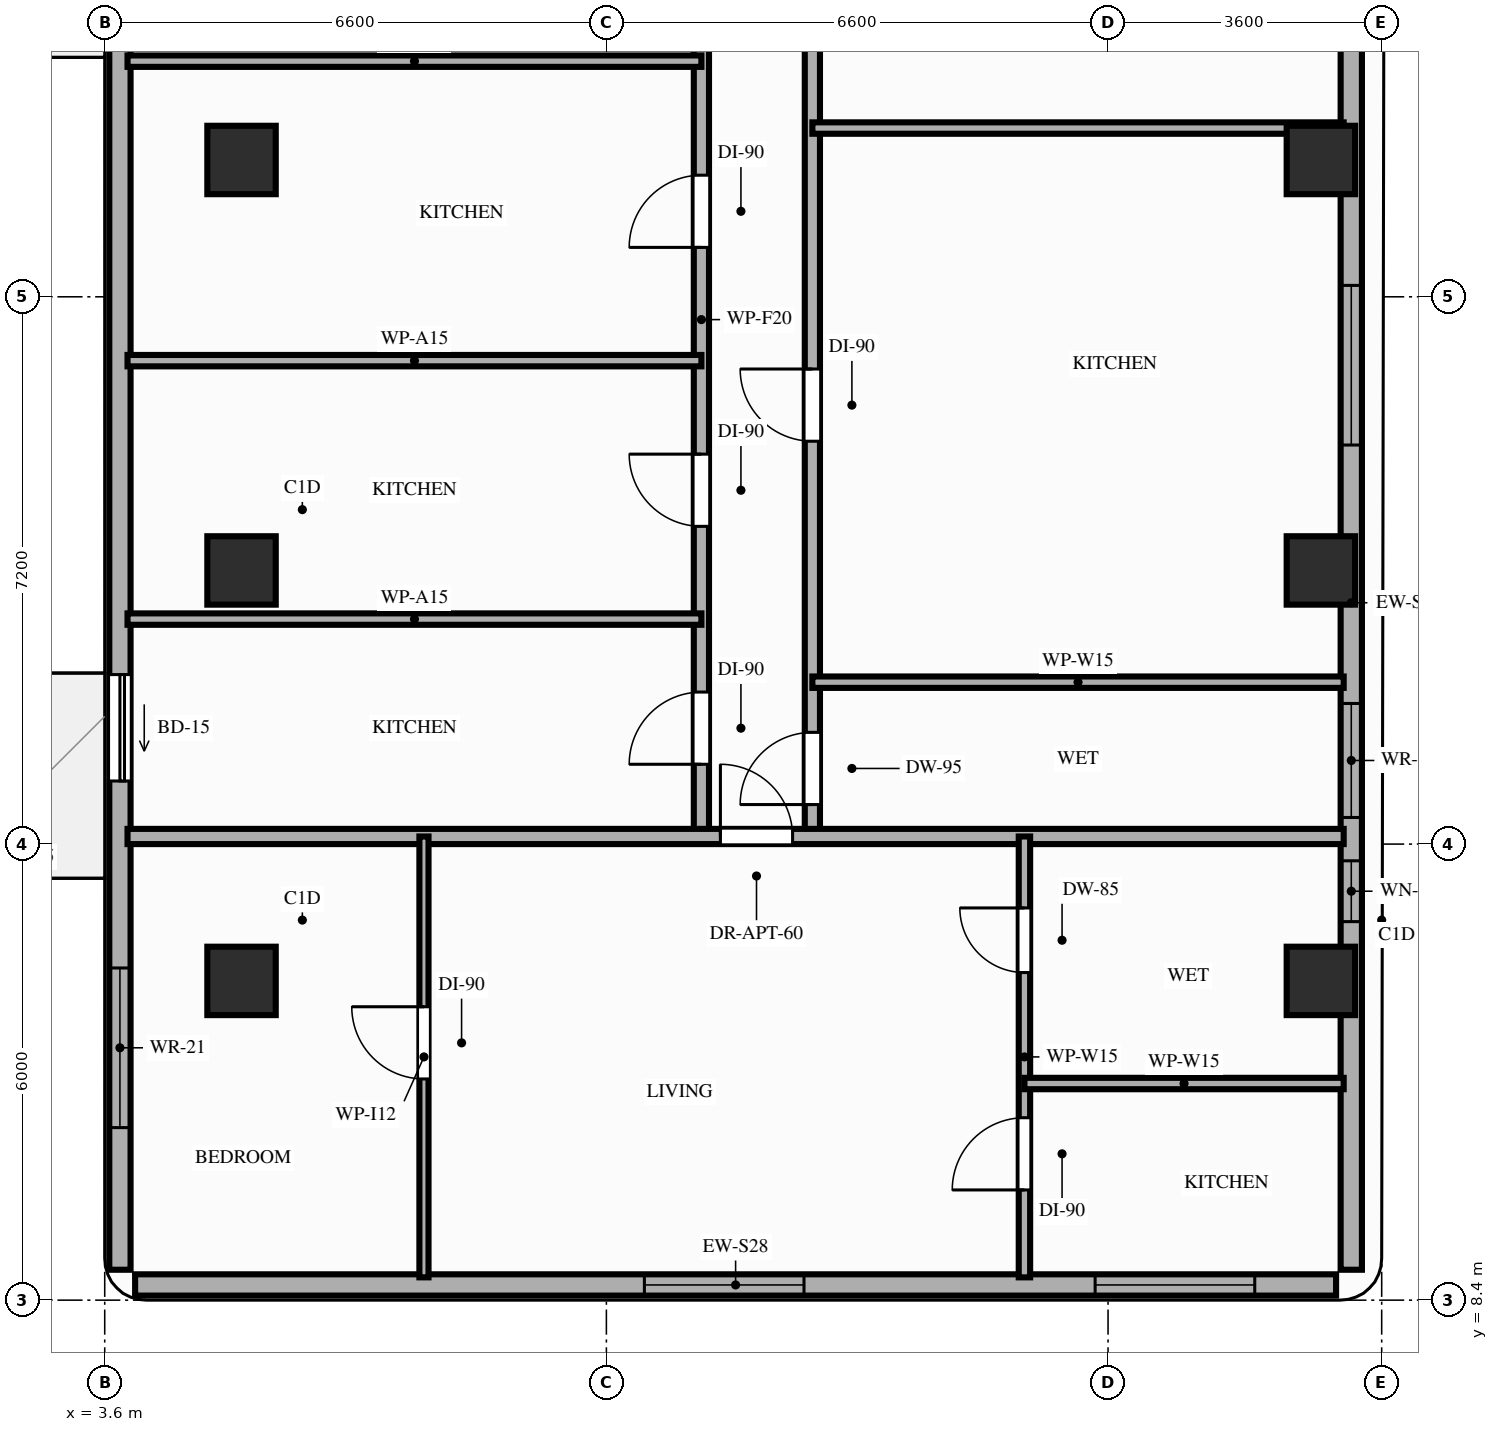
"""IFC4 building model, lengths in metres.
Left out: names, types, materials, properties, quantities, classifications, styles, units other than length and angle.
Written with IfcOpenShell. Run it as: python <this file> out.ifc"""

import sys

from ifc_helpers import new_model, si_unit, direction, frame, frame_2d, origin, origin_2d, place, context, subcontext, project, spatial, rectangle, extrude, element, fill, save


model = new_model("IFC4")
c1 = context("Model", 3, precision=1e-05, world=origin(), true_north=direction((0.0, 1.0)))
c2 = subcontext(c1, "Body", "Model", "MODEL_VIEW")
j1 = project(units=[si_unit("LENGTHUNIT", "METRE"), si_unit("PLANEANGLEUNIT", "RADIAN")], contexts=[c1])
p1 = place(None, origin())
s1 = spatial("IfcSite", under=j1, at=p1, CompositionType="ELEMENT")
p2 = place(p1, origin())
s2 = spatial("IfcBuilding", under=s1, at=p2, CompositionType="ELEMENT")
p3 = place(p2, frame((0.0, 0.0, 198.4)))
s3 = spatial("IfcBuildingStorey", under=s2, at=p3, CompositionType="ELEMENT", Elevation=198.4)
for number, where, z_axis, x_axis in (
    (1, (5.4, 12.6, 0.0), (0.0, 0.0, 1.0), (1.0, 0.0, 0.0)),
    (2, (19.6, 12.6, 0.0), (0.0, 0.0, 1.0), (1.0, 0.0, 0.0)),
    (3, (5.4, 18.0, 0.0), (0.0, 0.0, 1.0), (1.0, 0.0, 0.0)),
    (4, (19.6, 18.0, 0.0), (0.0, 0.0, 1.0), (1.0, 0.0, 0.0)),
    (5, (5.4, 23.4, 0.0), (0.0, 0.0, 1.0), (1.0, 0.0, 0.0)),
    (6, (19.6, 23.4, 0.0), (0.0, 0.0, 1.0), (1.0, 0.0, 0.0)),
):
    element("IfcColumn", number, at=place(p3, frame(where, z_axis=z_axis, x_axis=x_axis)), inside=s3, PredefinedType="COLUMN", context=c2, shape_type="SweptSolid", body=[
        extrude(rectangle(XDim=0.9, YDim=0.9, at=origin_2d()), origin(), (0.0, 0.0, 1.0), 3.2),
    ])
p4 = place(p3, frame((4.0, 8.6, 0.0), z_axis=(0.0, 0.0, 1.0), x_axis=(1.0, 0.0, 0.0)))
e7 = element("IfcWall", 7, at=p4, inside=s3, PredefinedType="STANDARD", context=c2, shape_type="SweptSolid", body=[
    extrude(rectangle(XDim=15.8, YDim=0.28, at=frame_2d((7.9, 0.0))), origin(), (0.0, 0.0, 1.0), 3.02),
])
p5 = place(p4, frame((6.7, 0.0, 0.85)))
e8 = element("IfcOpeningElement", 8, at=p5, cuts=e7, PredefinedType="OPENING", context=c2, shape_type="SweptSolid", body=[
    extrude(rectangle(XDim=2.1, YDim=1.8, at=frame_2d((1.05, 0.9))), frame((0.0, 0.15, 0.0), z_axis=(0.0, -1.0, 0.0), x_axis=(1.0, 0.0, 0.0)), (0.0, 0.0, 1.0), 0.3),
])
p6 = place(p4, frame((12.63, 0.0, 0.85)))
e9 = element("IfcOpeningElement", 9, at=p6, cuts=e7, PredefinedType="OPENING", context=c2, shape_type="SweptSolid", body=[
    extrude(rectangle(XDim=2.1, YDim=1.8, at=frame_2d((1.05, 0.9))), frame((0.0, 0.15, 0.0), z_axis=(0.0, -1.0, 0.0), x_axis=(1.0, 0.0, 0.0)), (0.0, 0.0, 1.0), 0.3),
])
p7 = place(p3, frame((3.8, 42.1, 0.0), z_axis=(0.0, 0.0, 1.0), x_axis=(0.0, -1.0, 0.0)))
e10 = element("IfcWall", 10, at=p7, inside=s3, PredefinedType="STANDARD", context=c2, shape_type="SweptSolid", body=[
    extrude(rectangle(XDim=33.3, YDim=0.28, at=frame_2d((16.65, 0.0))), origin(), (0.0, 0.0, 1.0), 2.71),
])
p8 = place(p7, frame((25.47, 0.0, 0.0)))
e11 = element("IfcOpeningElement", 11, at=p8, cuts=e10, PredefinedType="OPENING", context=c2, shape_type="SweptSolid", body=[
    extrude(rectangle(XDim=1.4, YDim=2.1, at=frame_2d((0.7, 1.05))), frame((0.0, 0.15, 0.0), z_axis=(0.0, -1.0, 0.0), x_axis=(1.0, 0.0, 0.0)), (0.0, 0.0, 1.0), 0.3),
])
p9 = place(p7, frame((15.3, 0.0, 0.0)))
e12 = element("IfcOpeningElement", 12, at=p9, cuts=e10, PredefinedType="OPENING", context=c2, shape_type="SweptSolid", body=[
    extrude(rectangle(XDim=1.4, YDim=2.1, at=frame_2d((0.7, 1.05))), frame((0.0, 0.15, 0.0), z_axis=(0.0, -1.0, 0.0), x_axis=(1.0, 0.0, 0.0)), (0.0, 0.0, 1.0), 0.3),
])
p10 = place(p7, frame((29.33, 0.0, 0.85)))
e13 = element("IfcOpeningElement", 13, at=p10, cuts=e10, PredefinedType="OPENING", context=c2, shape_type="SweptSolid", body=[
    extrude(rectangle(XDim=2.1, YDim=1.61, at=frame_2d((1.05, 0.805))), frame((0.0, 0.15, 0.0), z_axis=(0.0, -1.0, 0.0), x_axis=(1.0, 0.0, 0.0)), (0.0, 0.0, 1.0), 0.3),
])
p11 = place(p7, frame((9.75, 0.0, 0.85)))
e14 = element("IfcOpeningElement", 14, at=p11, cuts=e10, PredefinedType="OPENING", context=c2, shape_type="SweptSolid", body=[
    extrude(rectangle(XDim=2.1, YDim=1.61, at=frame_2d((1.05, 0.805))), frame((0.0, 0.15, 0.0), z_axis=(0.0, -1.0, 0.0), x_axis=(1.0, 0.0, 0.0)), (0.0, 0.0, 1.0), 0.3),
])
p12 = place(p7, frame((3.65, 0.0, 0.85)))
e15 = element("IfcOpeningElement", 15, at=p12, cuts=e10, PredefinedType="OPENING", context=c2, shape_type="SweptSolid", body=[
    extrude(rectangle(XDim=2.1, YDim=1.61, at=frame_2d((1.05, 0.805))), frame((0.0, 0.15, 0.0), z_axis=(0.0, -1.0, 0.0), x_axis=(1.0, 0.0, 0.0)), (0.0, 0.0, 1.0), 0.3),
])
p13 = place(p3, frame((20.0, 8.8, 0.0), z_axis=(0.0, 0.0, 1.0), x_axis=(0.0, 1.0, 0.0)))
e16 = element("IfcWall", 16, at=p13, inside=s3, PredefinedType="STANDARD", context=c2, shape_type="SweptSolid", body=[
    extrude(rectangle(XDim=17.55, YDim=0.28, at=frame_2d((8.775, 0.0))), origin(), (0.0, 0.0, 1.0), 2.51),
])
p14 = place(p13, frame((4.58, 0.0, 0.85)))
e17 = element("IfcOpeningElement", 17, at=p14, cuts=e16, PredefinedType="OPENING", context=c2, shape_type="SweptSolid", body=[
    extrude(rectangle(XDim=0.8, YDim=1.41, at=frame_2d((0.4, 0.705))), frame((0.0, 0.15, 0.0), z_axis=(0.0, -1.0, 0.0), x_axis=(1.0, 0.0, 0.0)), (0.0, 0.0, 1.0), 0.3),
])
p15 = place(p13, frame((5.95, 0.0, 0.85)))
e18 = element("IfcOpeningElement", 18, at=p15, cuts=e16, PredefinedType="OPENING", context=c2, shape_type="SweptSolid", body=[
    extrude(rectangle(XDim=1.5, YDim=1.41, at=frame_2d((0.75, 0.705))), frame((0.0, 0.15, 0.0), z_axis=(0.0, -1.0, 0.0), x_axis=(1.0, 0.0, 0.0)), (0.0, 0.0, 1.0), 0.3),
])
p16 = place(p13, frame((10.85, 0.0, 0.85)))
e19 = element("IfcOpeningElement", 19, at=p16, cuts=e16, PredefinedType="OPENING", context=c2, shape_type="SweptSolid", body=[
    extrude(rectangle(XDim=2.1, YDim=1.41, at=frame_2d((1.05, 0.705))), frame((0.0, 0.15, 0.0), z_axis=(0.0, -1.0, 0.0), x_axis=(1.0, 0.0, 0.0)), (0.0, 0.0, 1.0), 0.3),
])
p17 = place(p3, frame((11.45, 14.5, 0.0), z_axis=(0.0, 0.0, 1.0), x_axis=(0.0, 1.0, 0.0)))
e20 = element("IfcWall", 20, at=p17, inside=s3, PredefinedType="PARTITIONING", context=c2, shape_type="SweptSolid", body=[
    extrude(rectangle(XDim=13.6, YDim=0.2, at=frame_2d((6.8, 0.0))), origin(), (0.0, 0.0, 1.0), 2.51),
])
p18 = place(p17, frame((0.95, 0.0, 0.0)))
e21 = element("IfcOpeningElement", 21, at=p18, cuts=e20, PredefinedType="OPENING", context=c2, shape_type="SweptSolid", body=[
    extrude(rectangle(XDim=0.95, YDim=2.15, at=frame_2d((0.475, 1.075))), frame((0.0, 0.11, 0.0), z_axis=(0.0, -1.0, 0.0), x_axis=(1.0, 0.0, 0.0)), (0.0, 0.0, 1.0), 0.22),
])
p19 = place(p17, frame((4.08, 0.0, 0.0)))
e22 = element("IfcOpeningElement", 22, at=p19, cuts=e20, PredefinedType="OPENING", context=c2, shape_type="SweptSolid", body=[
    extrude(rectangle(XDim=0.95, YDim=2.15, at=frame_2d((0.475, 1.075))), frame((0.0, 0.11, 0.0), z_axis=(0.0, -1.0, 0.0), x_axis=(1.0, 0.0, 0.0)), (0.0, 0.0, 1.0), 0.22),
])
p20 = place(p17, frame((7.75, 0.0, 0.0)))
e23 = element("IfcOpeningElement", 23, at=p20, cuts=e20, PredefinedType="OPENING", context=c2, shape_type="SweptSolid", body=[
    extrude(rectangle(XDim=0.95, YDim=2.15, at=frame_2d((0.475, 1.075))), frame((0.0, 0.11, 0.0), z_axis=(0.0, -1.0, 0.0), x_axis=(1.0, 0.0, 0.0)), (0.0, 0.0, 1.0), 0.22),
])
p21 = place(p17, frame((11.42, 0.0, 0.0)))
e24 = element("IfcOpeningElement", 24, at=p21, cuts=e20, PredefinedType="OPENING", context=c2, shape_type="SweptSolid", body=[
    extrude(rectangle(XDim=0.95, YDim=2.15, at=frame_2d((0.475, 1.075))), frame((0.0, 0.11, 0.0), z_axis=(0.0, -1.0, 0.0), x_axis=(1.0, 0.0, 0.0)), (0.0, 0.0, 1.0), 0.22),
])
p22 = place(p3, frame((12.91, 14.5, 0.0), z_axis=(0.0, 0.0, 1.0), x_axis=(0.0, 1.0, 0.0)))
e25 = element("IfcWall", 25, at=p22, inside=s3, PredefinedType="PARTITIONING", context=c2, shape_type="SweptSolid", body=[
    extrude(rectangle(XDim=13.6, YDim=0.2, at=frame_2d((6.8, 0.0))), origin(), (0.0, 0.0, 1.0), 2.51),
])
p23 = place(p22, frame((0.42, 0.0, 0.0)))
e26 = element("IfcOpeningElement", 26, at=p23, cuts=e25, PredefinedType="OPENING", context=c2, shape_type="SweptSolid", body=[
    extrude(rectangle(XDim=0.95, YDim=2.1, at=frame_2d((0.475, 1.05))), frame((0.0, 0.11, 0.0), z_axis=(0.0, -1.0, 0.0), x_axis=(1.0, 0.0, 0.0)), (0.0, 0.0, 1.0), 0.22),
])
p24 = place(p22, frame((5.2, 0.0, 0.0)))
e27 = element("IfcOpeningElement", 27, at=p24, cuts=e25, PredefinedType="OPENING", context=c2, shape_type="SweptSolid", body=[
    extrude(rectangle(XDim=0.95, YDim=2.15, at=frame_2d((0.475, 1.075))), frame((0.0, 0.11, 0.0), z_axis=(0.0, -1.0, 0.0), x_axis=(1.0, 0.0, 0.0)), (0.0, 0.0, 1.0), 0.22),
])
p25 = place(p22, frame((10.98, 0.0, 0.0)))
e28 = element("IfcOpeningElement", 28, at=p25, cuts=e25, PredefinedType="OPENING", context=c2, shape_type="SweptSolid", body=[
    extrude(rectangle(XDim=0.95, YDim=2.15, at=frame_2d((0.475, 1.075))), frame((0.0, 0.11, 0.0), z_axis=(0.0, -1.0, 0.0), x_axis=(1.0, 0.0, 0.0)), (0.0, 0.0, 1.0), 0.22),
])
p26 = place(p3, frame((3.9, 14.5, 0.0), z_axis=(0.0, 0.0, 1.0), x_axis=(1.0, 0.0, 0.0)))
e29 = element("IfcWall", 29, at=p26, inside=s3, PredefinedType="PARTITIONING", context=c2, shape_type="SweptSolid", body=[
    extrude(rectangle(XDim=16.0, YDim=0.2, at=frame_2d((8.0, 0.0))), origin(), (0.0, 0.0, 1.0), 2.51),
])
p27 = place(p26, frame((7.8, 0.0, 0.0)))
e30 = element("IfcOpeningElement", 30, at=p27, cuts=e29, PredefinedType="OPENING", context=c2, shape_type="SweptSolid", body=[
    extrude(rectangle(XDim=0.95, YDim=2.15, at=frame_2d((0.475, 1.075))), frame((0.0, 0.11, 0.0), z_axis=(0.0, -1.0, 0.0), x_axis=(1.0, 0.0, 0.0)), (0.0, 0.0, 1.0), 0.22),
])
p28 = place(p3, frame((7.8, 8.7, 0.0), z_axis=(0.0, 0.0, 1.0), x_axis=(0.0, 1.0, 0.0)))
e31 = element("IfcWall", 31, at=p28, inside=s3, PredefinedType="PARTITIONING", context=c2, shape_type="SweptSolid", body=[
    extrude(rectangle(XDim=5.8, YDim=0.12, at=frame_2d((2.9, 0.0))), origin(), (0.0, 0.0, 1.0), 2.51),
])
p29 = place(p28, frame((2.61, 0.0, 0.0)))
e32 = element("IfcOpeningElement", 32, at=p29, cuts=e31, PredefinedType="OPENING", context=c2, shape_type="SweptSolid", body=[
    extrude(rectangle(XDim=0.95, YDim=2.15, at=frame_2d((0.475, 1.075))), frame((0.0, 0.07, 0.0), z_axis=(0.0, -1.0, 0.0), x_axis=(1.0, 0.0, 0.0)), (0.0, 0.0, 1.0), 0.14),
])
p30 = place(p3, frame((15.7, 8.7, 0.0), z_axis=(0.0, 0.0, 1.0), x_axis=(0.0, 1.0, 0.0)))
e33 = element("IfcWall", 33, at=p30, inside=s3, PredefinedType="PARTITIONING", context=c2, shape_type="SweptSolid", body=[
    extrude(rectangle(XDim=5.8, YDim=0.15, at=frame_2d((2.9, 0.0))), origin(), (0.0, 0.0, 1.0), 2.51),
])
p31 = place(p30, frame((1.15, 0.0, 0.0)))
e34 = element("IfcOpeningElement", 34, at=p31, cuts=e33, PredefinedType="OPENING", context=c2, shape_type="SweptSolid", body=[
    extrude(rectangle(XDim=0.95, YDim=2.15, at=frame_2d((0.475, 1.075))), frame((0.0, 0.085, 0.0), z_axis=(0.0, -1.0, 0.0), x_axis=(1.0, 0.0, 0.0)), (0.0, 0.0, 1.0), 0.17),
])
p32 = place(p30, frame((4.01, 0.0, 0.0)))
e35 = element("IfcOpeningElement", 35, at=p32, cuts=e33, PredefinedType="OPENING", context=c2, shape_type="SweptSolid", body=[
    extrude(rectangle(XDim=0.85, YDim=2.1, at=frame_2d((0.425, 1.05))), frame((0.0, 0.085, 0.0), z_axis=(0.0, -1.0, 0.0), x_axis=(1.0, 0.0, 0.0)), (0.0, 0.0, 1.0), 0.17),
])
p33 = place(p3, frame((15.7, 11.25, 0.0), z_axis=(0.0, 0.0, 1.0), x_axis=(1.0, 0.0, 0.0)))
e36 = element("IfcWall", 36, at=p33, inside=s3, PredefinedType="PARTITIONING", context=c2, shape_type="SweptSolid", body=[
    extrude(rectangle(XDim=4.2, YDim=0.15, at=frame_2d((2.1, 0.0))), origin(), (0.0, 0.0, 1.0), 3.02),
])
for number, where, z_axis, x_axis in (
    (37, (3.9, 17.36, 0.0), (0.0, 0.0, 1.0), (1.0, 0.0, 0.0)),
    (38, (3.9, 20.76, 0.0), (0.0, 0.0, 1.0), (1.0, 0.0, 0.0)),
    (39, (3.9, 24.7, 0.0), (0.0, 0.0, 1.0), (1.0, 0.0, 0.0)),
):
    element("IfcWall", number, at=place(p3, frame(where, z_axis=z_axis, x_axis=x_axis)), inside=s3, PredefinedType="PARTITIONING", context=c2, shape_type="SweptSolid", body=[
        extrude(rectangle(XDim=7.55, YDim=0.15, at=frame_2d((3.775, 0.0))), origin(), (0.0, 0.0, 1.0), 2.51),
    ])
for number, where, z_axis, x_axis in (
    (40, (12.91, 16.53, 0.0), (0.0, 0.0, 1.0), (1.0, 0.0, 0.0)),
    (41, (12.91, 23.82, 0.0), (0.0, 0.0, 1.0), (1.0, 0.0, 0.0)),
):
    element("IfcWall", number, at=place(p3, frame(where, z_axis=z_axis, x_axis=x_axis)), inside=s3, PredefinedType="PARTITIONING", context=c2, shape_type="SweptSolid", body=[
        extrude(rectangle(XDim=6.99, YDim=0.15, at=frame_2d((3.495, 0.0))), origin(), (0.0, 0.0, 1.0), 2.51),
    ])
p34 = place(p8, origin())
e42 = element("IfcDoor", 42, at=p34, inside=s3, OperationType="SLIDING_TO_RIGHT", PredefinedType="DOOR", context=c2, shape_type="SweptSolid", body=[
    extrude(rectangle(XDim=1.4, YDim=2.1, at=frame_2d((0.7, 1.05))), frame((0.0, 0.025, 0.0), z_axis=(0.0, -1.0, 0.0), x_axis=(1.0, 0.0, 0.0)), (0.0, 0.0, 1.0), 0.05),
])
fill(e11, e42)
p35 = place(p10, origin())
e43 = element("IfcWindow", 43, at=p35, inside=s3, PartitioningType="SINGLE_PANEL", PredefinedType="WINDOW", context=c2, shape_type="SweptSolid", body=[
    extrude(rectangle(XDim=2.1, YDim=1.61, at=frame_2d((1.05, 0.805))), frame((0.0, 0.03, 0.0), z_axis=(0.0, -1.0, 0.0), x_axis=(1.0, 0.0, 0.0)), (0.0, 0.0, 1.0), 0.06),
])
fill(e13, e43)
p36 = place(p5, origin())
e44 = element("IfcWindow", 44, at=p36, inside=s3, PartitioningType="SINGLE_PANEL", PredefinedType="WINDOW", context=c2, shape_type="SweptSolid", body=[
    extrude(rectangle(XDim=2.1, YDim=1.8, at=frame_2d((1.05, 0.9))), frame((0.0, 0.03, 0.0), z_axis=(0.0, -1.0, 0.0), x_axis=(1.0, 0.0, 0.0)), (0.0, 0.0, 1.0), 0.06),
])
fill(e8, e44)
p37 = place(p6, origin())
e45 = element("IfcWindow", 45, at=p37, inside=s3, PartitioningType="SINGLE_PANEL", PredefinedType="WINDOW", context=c2, shape_type="SweptSolid", body=[
    extrude(rectangle(XDim=2.1, YDim=1.8, at=frame_2d((1.05, 0.9))), frame((0.0, 0.03, 0.0), z_axis=(0.0, -1.0, 0.0), x_axis=(1.0, 0.0, 0.0)), (0.0, 0.0, 1.0), 0.06),
])
fill(e9, e45)
p38 = place(p14, origin())
e46 = element("IfcWindow", 46, at=p38, inside=s3, PartitioningType="SINGLE_PANEL", PredefinedType="WINDOW", context=c2, shape_type="SweptSolid", body=[
    extrude(rectangle(XDim=0.8, YDim=1.41, at=frame_2d((0.4, 0.705))), frame((0.0, 0.03, 0.0), z_axis=(0.0, -1.0, 0.0), x_axis=(1.0, 0.0, 0.0)), (0.0, 0.0, 1.0), 0.06),
])
fill(e17, e46)
p39 = place(p15, origin())
e47 = element("IfcWindow", 47, at=p39, inside=s3, PartitioningType="SINGLE_PANEL", PredefinedType="WINDOW", context=c2, shape_type="SweptSolid", body=[
    extrude(rectangle(XDim=1.5, YDim=1.41, at=frame_2d((0.75, 0.705))), frame((0.0, 0.03, 0.0), z_axis=(0.0, -1.0, 0.0), x_axis=(1.0, 0.0, 0.0)), (0.0, 0.0, 1.0), 0.06),
])
fill(e18, e47)
p40 = place(p16, origin())
e48 = element("IfcWindow", 48, at=p40, inside=s3, PartitioningType="SINGLE_PANEL", PredefinedType="WINDOW", context=c2, shape_type="SweptSolid", body=[
    extrude(rectangle(XDim=2.1, YDim=1.41, at=frame_2d((1.05, 0.705))), frame((0.0, 0.03, 0.0), z_axis=(0.0, -1.0, 0.0), x_axis=(1.0, 0.0, 0.0)), (0.0, 0.0, 1.0), 0.06),
])
fill(e19, e48)
p41 = place(p27, origin())
e49 = element("IfcDoor", 49, at=p41, inside=s3, OperationType="SINGLE_SWING_LEFT", PredefinedType="DOOR", context=c2, shape_type="SweptSolid", body=[
    extrude(rectangle(XDim=0.95, YDim=2.15, at=frame_2d((0.475, 1.075))), frame((0.0, 0.025, 0.0), z_axis=(0.0, -1.0, 0.0), x_axis=(1.0, 0.0, 0.0)), (0.0, 0.0, 1.0), 0.05),
])
fill(e30, e49)
p42 = place(p29, origin())
e50 = element("IfcDoor", 50, at=p42, inside=s3, OperationType="SINGLE_SWING_RIGHT", PredefinedType="DOOR", context=c2, shape_type="SweptSolid", body=[
    extrude(rectangle(XDim=0.95, YDim=2.15, at=frame_2d((0.475, 1.075))), frame((0.0, 0.025, 0.0), z_axis=(0.0, -1.0, 0.0), x_axis=(1.0, 0.0, 0.0)), (0.0, 0.0, 1.0), 0.05),
])
fill(e32, e50)
p43 = place(p31, origin())
e51 = element("IfcDoor", 51, at=p43, inside=s3, OperationType="SINGLE_SWING_LEFT", PredefinedType="DOOR", context=c2, shape_type="SweptSolid", body=[
    extrude(rectangle(XDim=0.95, YDim=2.15, at=frame_2d((0.475, 1.075))), frame((0.0, 0.025, 0.0), z_axis=(0.0, -1.0, 0.0), x_axis=(1.0, 0.0, 0.0)), (0.0, 0.0, 1.0), 0.05),
])
fill(e34, e51)
p44 = place(p32, origin())
e52 = element("IfcDoor", 52, at=p44, inside=s3, OperationType="SINGLE_SWING_RIGHT", PredefinedType="DOOR", context=c2, shape_type="SweptSolid", body=[
    extrude(rectangle(XDim=0.85, YDim=2.1, at=frame_2d((0.425, 1.05))), frame((0.0, 0.025, 0.0), z_axis=(0.0, -1.0, 0.0), x_axis=(1.0, 0.0, 0.0)), (0.0, 0.0, 1.0), 0.05),
])
fill(e35, e52)
p45 = place(p18, origin())
e53 = element("IfcDoor", 53, at=p45, inside=s3, OperationType="SINGLE_SWING_LEFT", PredefinedType="DOOR", context=c2, shape_type="SweptSolid", body=[
    extrude(rectangle(XDim=0.95, YDim=2.15, at=frame_2d((0.475, 1.075))), frame((0.0, 0.025, 0.0), z_axis=(0.0, -1.0, 0.0), x_axis=(1.0, 0.0, 0.0)), (0.0, 0.0, 1.0), 0.05),
])
fill(e21, e53)
p46 = place(p19, origin())
e54 = element("IfcDoor", 54, at=p46, inside=s3, OperationType="SINGLE_SWING_RIGHT", PredefinedType="DOOR", context=c2, shape_type="SweptSolid", body=[
    extrude(rectangle(XDim=0.95, YDim=2.15, at=frame_2d((0.475, 1.075))), frame((0.0, 0.025, 0.0), z_axis=(0.0, -1.0, 0.0), x_axis=(1.0, 0.0, 0.0)), (0.0, 0.0, 1.0), 0.05),
])
fill(e22, e54)
p47 = place(p20, origin())
e55 = element("IfcDoor", 55, at=p47, inside=s3, OperationType="SINGLE_SWING_LEFT", PredefinedType="DOOR", context=c2, shape_type="SweptSolid", body=[
    extrude(rectangle(XDim=0.95, YDim=2.15, at=frame_2d((0.475, 1.075))), frame((0.0, 0.025, 0.0), z_axis=(0.0, -1.0, 0.0), x_axis=(1.0, 0.0, 0.0)), (0.0, 0.0, 1.0), 0.05),
])
fill(e23, e55)
p48 = place(p23, origin())
e56 = element("IfcDoor", 56, at=p48, inside=s3, OperationType="SINGLE_SWING_LEFT", PredefinedType="DOOR", context=c2, shape_type="SweptSolid", body=[
    extrude(rectangle(XDim=0.95, YDim=2.1, at=frame_2d((0.475, 1.05))), frame((0.0, 0.025, 0.0), z_axis=(0.0, -1.0, 0.0), x_axis=(1.0, 0.0, 0.0)), (0.0, 0.0, 1.0), 0.05),
])
fill(e26, e56)
p49 = place(p24, origin())
e57 = element("IfcDoor", 57, at=p49, inside=s3, OperationType="SINGLE_SWING_RIGHT", PredefinedType="DOOR", context=c2, shape_type="SweptSolid", body=[
    extrude(rectangle(XDim=0.95, YDim=2.15, at=frame_2d((0.475, 1.075))), frame((0.0, 0.025, 0.0), z_axis=(0.0, -1.0, 0.0), x_axis=(1.0, 0.0, 0.0)), (0.0, 0.0, 1.0), 0.05),
])
fill(e27, e57)
save(model, sys.argv[1])
